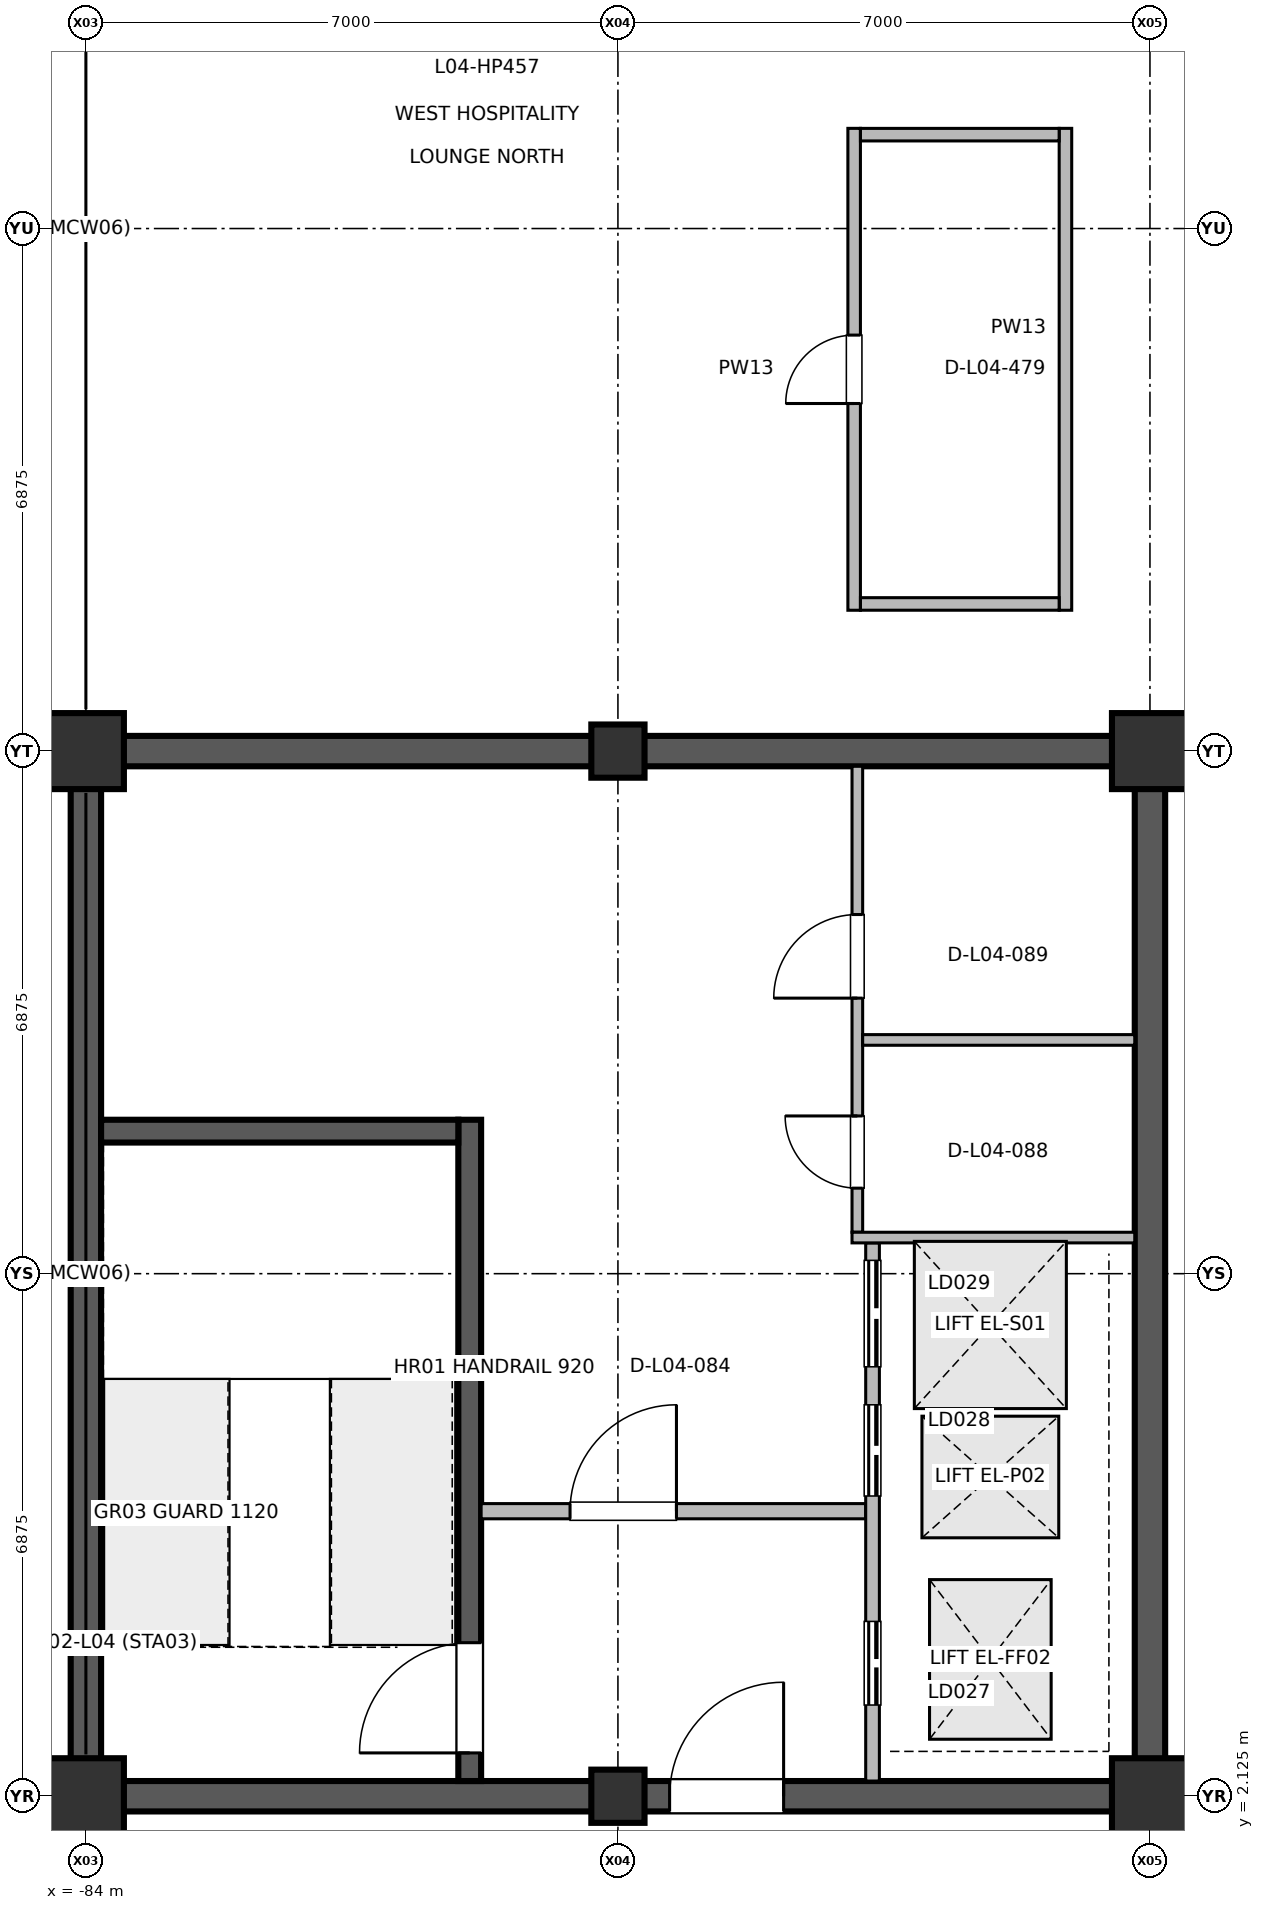
"""IFC4 building model, lengths in metres.
Left out: names, types, materials, properties, quantities, classifications, styles, units other than length and angle.
Written with IfcOpenShell. Run it as: python <this file> out.ifc"""

import sys

from ifc_helpers import new_model, si_unit, direction, frame, frame_2d, origin, origin_2d, place, context, subcontext, project, spatial, rectangle, extrude, element, fill, save


model = new_model("IFC4")
c1 = context("Model", 3, precision=1e-05, world=origin(), true_north=direction((0.0, 1.0)))
c2 = subcontext(c1, "Body", "Model", "MODEL_VIEW")
j1 = project(units=[si_unit("LENGTHUNIT", "METRE"), si_unit("PLANEANGLEUNIT", "RADIAN")], contexts=[c1])
p1 = place(None, origin())
s1 = spatial("IfcSite", under=j1, at=p1, CompositionType="ELEMENT")
p2 = place(p1, origin())
s2 = spatial("IfcBuilding", under=s1, at=p2, CompositionType="ELEMENT")
p3 = place(p2, frame((0.0, 0.0, 16.2)))
s3 = spatial("IfcBuildingStorey", under=s2, at=p3, CompositionType="ELEMENT", Elevation=16.2)
for number, where, z_axis, x_axis in (
    (1, (-84.0, 2.125, 0.0), (0.0, 0.0, 1.0), (1.0, 0.0, 0.0)),
    (2, (-84.0, 15.875, 0.0), (0.0, 0.0, 1.0), (1.0, 0.0, 0.0)),
):
    element("IfcColumn", number, at=place(p3, frame(where, z_axis=z_axis, x_axis=x_axis)), inside=s3, PredefinedType="COLUMN", context=c2, shape_type="SweptSolid", body=[
        extrude(rectangle(XDim=1.0, YDim=1.0, at=origin_2d()), origin(), (0.0, 0.0, 1.0), 4.798),
    ])
for number, where, z_axis, x_axis in (
    (3, (-77.0, 2.125, 0.0), (0.0, 0.0, 1.0), (1.0, 0.0, 0.0)),
    (4, (-77.0, 15.875, 0.0), (0.0, 0.0, 1.0), (1.0, 0.0, 0.0)),
):
    element("IfcColumn", number, at=place(p3, frame(where, z_axis=z_axis, x_axis=x_axis)), inside=s3, PredefinedType="COLUMN", context=c2, shape_type="SweptSolid", body=[
        extrude(rectangle(XDim=0.7, YDim=0.7, at=origin_2d()), origin(), (0.0, 0.0, 1.0), 4.6),
    ])
for number, where, z_axis, x_axis in (
    (5, (-70.0, 2.125, 0.0), (0.0, 0.0, 1.0), (1.0, 0.0, 0.0)),
    (6, (-70.0, 15.875, 0.0), (0.0, 0.0, 1.0), (1.0, 0.0, 0.0)),
):
    element("IfcColumn", number, at=place(p3, frame(where, z_axis=z_axis, x_axis=x_axis)), inside=s3, PredefinedType="COLUMN", context=c2, shape_type="SweptSolid", body=[
        extrude(rectangle(XDim=1.0, YDim=1.0, at=origin_2d()), origin(), (0.0, 0.0, 1.0), 4.798),
    ])
for number, where, z_axis, x_axis in (
    (7, (-84.0, 2.325, 0.0), (0.0, 0.0, 1.0), (0.0, 1.0, 0.0)),
    (8, (-70.0, 2.325, 0.0), (0.0, 0.0, 1.0), (0.0, 1.0, 0.0)),
):
    element("IfcWall", number, at=place(p3, frame(where, z_axis=z_axis, x_axis=x_axis)), inside=s3, PredefinedType="SHEAR", context=c2, shape_type="SweptSolid", body=[
        extrude(rectangle(XDim=13.35, YDim=0.4, at=frame_2d((6.675, 0.0))), origin(), (0.0, 0.0, 1.0), 4.6),
    ])
p4 = place(p3, frame((-83.8, 2.125, 0.0), z_axis=(0.0, 0.0, 1.0), x_axis=(1.0, 0.0, 0.0)))
e9 = element("IfcWall", 9, at=p4, inside=s3, PredefinedType="SHEAR", context=c2, shape_type="SweptSolid", body=[
    extrude(rectangle(XDim=13.6, YDim=0.4, at=frame_2d((6.8, 0.0))), origin(), (0.0, 0.0, 1.0), 4.6),
])
p5 = place(p4, frame((7.48, 0.0, 0.0)))
e10 = element("IfcOpeningElement", 10, at=p5, cuts=e9, PredefinedType="OPENING", context=c2, shape_type="SweptSolid", body=[
    extrude(rectangle(XDim=1.5, YDim=2.2, at=frame_2d((0.75, 1.1))), frame((0.0, 0.21, 0.0), z_axis=(0.0, -1.0, 0.0), x_axis=(1.0, 0.0, 0.0)), (0.0, 0.0, 1.0), 0.42),
])
p6 = place(p3, frame((-83.8, 15.875, 0.0), z_axis=(0.0, 0.0, 1.0), x_axis=(1.0, 0.0, 0.0)))
e11 = element("IfcWall", 11, at=p6, inside=s3, PredefinedType="SHEAR", context=c2, shape_type="SweptSolid", body=[
    extrude(rectangle(XDim=13.6, YDim=0.4, at=frame_2d((6.8, 0.0))), origin(), (0.0, 0.0, 1.0), 4.6),
])
p7 = place(p3, frame((-78.95, 2.325, 0.0), z_axis=(0.0, 0.0, 1.0), x_axis=(0.0, 1.0, 0.0)))
e12 = element("IfcWall", 12, at=p7, inside=s3, PredefinedType="SHEAR", context=c2, shape_type="SweptSolid", body=[
    extrude(rectangle(XDim=8.7, YDim=0.3, at=frame_2d((4.35, 0.0))), origin(), (0.0, 0.0, 1.0), 4.6),
])
p8 = place(p7, frame((0.37, 0.0, 0.0)))
e13 = element("IfcOpeningElement", 13, at=p8, cuts=e12, PredefinedType="OPENING", context=c2, shape_type="SweptSolid", body=[
    extrude(rectangle(XDim=1.45, YDim=2.2, at=frame_2d((0.725, 1.1))), frame((0.0, 0.16, 0.0), z_axis=(0.0, -1.0, 0.0), x_axis=(1.0, 0.0, 0.0)), (0.0, 0.0, 1.0), 0.32),
])
p9 = place(p3, frame((-78.8, 5.875, 0.0), z_axis=(0.0, 0.0, 1.0), x_axis=(1.0, 0.0, 0.0)))
e14 = element("IfcWall", 14, at=p9, inside=s3, PredefinedType="PARTITIONING", context=c2, shape_type="SweptSolid", body=[
    extrude(rectangle(XDim=5.06, YDim=0.2, at=frame_2d((2.53, 0.0))), origin(), (0.0, 0.0, 1.0), 3.82),
])
p10 = place(p9, frame((1.17, 0.0, 0.0)))
e15 = element("IfcOpeningElement", 15, at=p10, cuts=e14, PredefinedType="OPENING", context=c2, shape_type="SweptSolid", body=[
    extrude(rectangle(XDim=1.4, YDim=2.2, at=frame_2d((0.7, 1.1))), frame((0.0, 0.11, 0.0), z_axis=(0.0, -1.0, 0.0), x_axis=(1.0, 0.0, 0.0)), (0.0, 0.0, 1.0), 0.22),
])
p11 = place(p3, frame((-73.65, 2.325, 0.0), z_axis=(0.0, 0.0, 1.0), x_axis=(0.0, 1.0, 0.0)))
e16 = element("IfcWall", 16, at=p11, inside=s3, PredefinedType="PARTITIONING", context=c2, shape_type="SweptSolid", body=[
    extrude(rectangle(XDim=7.08, YDim=0.18, at=frame_2d((3.54, 0.0))), origin(), (0.0, 0.0, 1.0), 3.82),
])
p12 = place(p11, frame((1.0, 0.0, 0.0)))
e17 = element("IfcOpeningElement", 17, at=p12, cuts=e16, PredefinedType="OPENING", context=c2, shape_type="SweptSolid", body=[
    extrude(rectangle(XDim=1.1, YDim=2.2, at=frame_2d((0.55, 1.1))), frame((0.0, 0.1, 0.0), z_axis=(0.0, -1.0, 0.0), x_axis=(1.0, 0.0, 0.0)), (0.0, 0.0, 1.0), 0.2),
])
p13 = place(p11, frame((3.75, 0.0, 0.0)))
e18 = element("IfcOpeningElement", 18, at=p13, cuts=e16, PredefinedType="OPENING", context=c2, shape_type="SweptSolid", body=[
    extrude(rectangle(XDim=1.2, YDim=2.25, at=frame_2d((0.6, 1.125))), frame((0.0, 0.1, 0.0), z_axis=(0.0, -1.0, 0.0), x_axis=(1.0, 0.0, 0.0)), (0.0, 0.0, 1.0), 0.2),
])
p14 = place(p11, frame((5.45, 0.0, 0.0)))
e19 = element("IfcOpeningElement", 19, at=p14, cuts=e16, PredefinedType="OPENING", context=c2, shape_type="SweptSolid", body=[
    extrude(rectangle(XDim=1.4, YDim=2.3, at=frame_2d((0.7, 1.15))), frame((0.0, 0.1, 0.0), z_axis=(0.0, -1.0, 0.0), x_axis=(1.0, 0.0, 0.0)), (0.0, 0.0, 1.0), 0.2),
])
p15 = place(p3, frame((-73.85, 9.545, 0.0), z_axis=(0.0, 0.0, 1.0), x_axis=(0.0, 1.0, 0.0)))
e20 = element("IfcWall", 20, at=p15, inside=s3, PredefinedType="PARTITIONING", context=c2, shape_type="SweptSolid", body=[
    extrude(rectangle(XDim=6.13, YDim=0.14, at=frame_2d((3.065, 0.0))), origin(), (0.0, 0.0, 1.0), 3.82),
])
p16 = place(p15, frame((0.58, 0.0, 0.0)))
e21 = element("IfcOpeningElement", 21, at=p16, cuts=e20, PredefinedType="OPENING", context=c2, shape_type="SweptSolid", body=[
    extrude(rectangle(XDim=0.95, YDim=2.15, at=frame_2d((0.475, 1.075))), frame((0.0, 0.08, 0.0), z_axis=(0.0, -1.0, 0.0), x_axis=(1.0, 0.0, 0.0)), (0.0, 0.0, 1.0), 0.16),
])
p17 = place(p15, frame((3.08, 0.0, 0.0)))
e22 = element("IfcOpeningElement", 22, at=p17, cuts=e20, PredefinedType="OPENING", context=c2, shape_type="SweptSolid", body=[
    extrude(rectangle(XDim=1.1, YDim=2.15, at=frame_2d((0.55, 1.075))), frame((0.0, 0.08, 0.0), z_axis=(0.0, -1.0, 0.0), x_axis=(1.0, 0.0, 0.0)), (0.0, 0.0, 1.0), 0.16),
])
p18 = place(p3, frame((-73.892, 17.728, 0.0), z_axis=(0.0, 0.0, 1.0), x_axis=(0.0, 1.0, 0.0)))
e23 = element("IfcWall", 23, at=p18, inside=s3, PredefinedType="PARTITIONING", context=c2, shape_type="SweptSolid", body=[
    extrude(rectangle(XDim=6.34, YDim=0.165, at=frame_2d((3.17, 0.0))), origin(), (0.0, 0.0, 1.0), 3.82),
])
p19 = place(p18, frame((2.72, 0.0, 0.0)))
e24 = element("IfcOpeningElement", 24, at=p19, cuts=e23, PredefinedType="OPENING", context=c2, shape_type="SweptSolid", body=[
    extrude(rectangle(XDim=0.9, YDim=2.15, at=frame_2d((0.45, 1.075))), frame((0.0, 0.093, 0.0), z_axis=(0.0, -1.0, 0.0), x_axis=(1.0, 0.0, 0.0)), (0.0, 0.0, 1.0), 0.185),
])
p20 = place(p3, frame((-73.92, 9.475, 0.0), z_axis=(0.0, 0.0, 1.0), x_axis=(1.0, 0.0, 0.0)))
e25 = element("IfcWall", 25, at=p20, inside=s3, PredefinedType="PARTITIONING", context=c2, shape_type="SweptSolid", body=[
    extrude(rectangle(XDim=3.72, YDim=0.14, at=frame_2d((1.86, 0.0))), origin(), (0.0, 0.0, 1.0), 3.82),
])
p21 = place(p3, frame((-73.78, 12.075, 0.0), z_axis=(0.0, 0.0, 1.0), x_axis=(1.0, 0.0, 0.0)))
e26 = element("IfcWall", 26, at=p21, inside=s3, PredefinedType="PARTITIONING", context=c2, shape_type="SweptSolid", body=[
    extrude(rectangle(XDim=3.58, YDim=0.14, at=frame_2d((1.79, 0.0))), origin(), (0.0, 0.0, 1.0), 3.82),
])
p22 = place(p3, frame((-71.112, 17.728, 0.0), z_axis=(0.0, 0.0, 1.0), x_axis=(0.0, 1.0, 0.0)))
e27 = element("IfcWall", 27, at=p22, inside=s3, PredefinedType="PARTITIONING", context=c2, shape_type="SweptSolid", body=[
    extrude(rectangle(XDim=6.34, YDim=0.165, at=frame_2d((3.17, 0.0))), origin(), (0.0, 0.0, 1.0), 3.82),
])
for number, where, z_axis, x_axis in (
    (28, (-73.809, 17.811, 0.0), (0.0, 0.0, 1.0), (1.0, 0.0, 0.0)),
    (29, (-73.809, 23.985, 0.0), (0.0, 0.0, 1.0), (1.0, 0.0, 0.0)),
):
    element("IfcWall", number, at=place(p3, frame(where, z_axis=z_axis, x_axis=x_axis)), inside=s3, PredefinedType="PARTITIONING", context=c2, shape_type="SweptSolid", body=[
        extrude(rectangle(XDim=2.614, YDim=0.165, at=frame_2d((1.307, 0.0))), origin(), (0.0, 0.0, 1.0), 3.82),
    ])
p23 = place(p3, frame((-83.8, 10.875, 0.0), z_axis=(0.0, 0.0, 1.0), x_axis=(1.0, 0.0, 0.0)))
e30 = element("IfcWall", 30, at=p23, inside=s3, PredefinedType="SHEAR", context=c2, shape_type="SweptSolid", body=[
    extrude(rectangle(XDim=4.7, YDim=0.3, at=frame_2d((2.35, 0.0))), origin(), (0.0, 0.0, 1.0), 4.6),
])
p24 = place(p5, origin())
e31 = element("IfcDoor", 31, at=p24, inside=s3, OperationType="SINGLE_SWING_RIGHT", PredefinedType="DOOR", context=c2, shape_type="SweptSolid", body=[
    extrude(rectangle(XDim=1.5, YDim=2.2, at=frame_2d((0.75, 1.1))), frame((0.0, 0.025, 0.0), z_axis=(0.0, -1.0, 0.0), x_axis=(1.0, 0.0, 0.0)), (0.0, 0.0, 1.0), 0.05),
])
fill(e10, e31)
p25 = place(p8, origin())
e32 = element("IfcDoor", 32, at=p25, inside=s3, OperationType="SINGLE_SWING_LEFT", PredefinedType="DOOR", context=c2, shape_type="SweptSolid", body=[
    extrude(rectangle(XDim=1.45, YDim=2.2, at=frame_2d((0.725, 1.1))), frame((0.0, 0.025, 0.0), z_axis=(0.0, -1.0, 0.0), x_axis=(1.0, 0.0, 0.0)), (0.0, 0.0, 1.0), 0.05),
])
fill(e13, e32)
p26 = place(p10, origin())
e33 = element("IfcDoor", 33, at=p26, inside=s3, OperationType="SINGLE_SWING_RIGHT", PredefinedType="DOOR", context=c2, shape_type="SweptSolid", body=[
    extrude(rectangle(XDim=1.4, YDim=2.2, at=frame_2d((0.7, 1.1))), frame((0.0, 0.025, 0.0), z_axis=(0.0, -1.0, 0.0), x_axis=(1.0, 0.0, 0.0)), (0.0, 0.0, 1.0), 0.05),
])
fill(e15, e33)
p27 = place(p12, origin())
e34 = element("IfcDoor", 34, at=p27, inside=s3, OperationType="DOUBLE_DOOR_SLIDING", PredefinedType="DOOR", context=c2, shape_type="SweptSolid", body=[
    extrude(rectangle(XDim=1.1, YDim=2.2, at=frame_2d((0.55, 1.1))), frame((0.0, 0.025, 0.0), z_axis=(0.0, -1.0, 0.0), x_axis=(1.0, 0.0, 0.0)), (0.0, 0.0, 1.0), 0.05),
])
fill(e17, e34)
p28 = place(p13, origin())
e35 = element("IfcDoor", 35, at=p28, inside=s3, OperationType="DOUBLE_DOOR_SLIDING", PredefinedType="DOOR", context=c2, shape_type="SweptSolid", body=[
    extrude(rectangle(XDim=1.2, YDim=2.25, at=frame_2d((0.6, 1.125))), frame((0.0, 0.025, 0.0), z_axis=(0.0, -1.0, 0.0), x_axis=(1.0, 0.0, 0.0)), (0.0, 0.0, 1.0), 0.05),
])
fill(e18, e35)
p29 = place(p14, origin())
e36 = element("IfcDoor", 36, at=p29, inside=s3, OperationType="DOUBLE_DOOR_SLIDING", PredefinedType="DOOR", context=c2, shape_type="SweptSolid", body=[
    extrude(rectangle(XDim=1.4, YDim=2.3, at=frame_2d((0.7, 1.15))), frame((0.0, 0.025, 0.0), z_axis=(0.0, -1.0, 0.0), x_axis=(1.0, 0.0, 0.0)), (0.0, 0.0, 1.0), 0.05),
])
fill(e19, e36)
p30 = place(p16, origin())
e37 = element("IfcDoor", 37, at=p30, inside=s3, OperationType="SINGLE_SWING_RIGHT", PredefinedType="DOOR", context=c2, shape_type="SweptSolid", body=[
    extrude(rectangle(XDim=0.95, YDim=2.15, at=frame_2d((0.475, 1.075))), frame((0.0, 0.025, 0.0), z_axis=(0.0, -1.0, 0.0), x_axis=(1.0, 0.0, 0.0)), (0.0, 0.0, 1.0), 0.05),
])
fill(e21, e37)
p31 = place(p17, origin())
e38 = element("IfcDoor", 38, at=p31, inside=s3, OperationType="SINGLE_SWING_LEFT", PredefinedType="DOOR", context=c2, shape_type="SweptSolid", body=[
    extrude(rectangle(XDim=1.1, YDim=2.15, at=frame_2d((0.55, 1.075))), frame((0.0, 0.025, 0.0), z_axis=(0.0, -1.0, 0.0), x_axis=(1.0, 0.0, 0.0)), (0.0, 0.0, 1.0), 0.05),
])
fill(e22, e38)
p32 = place(p19, origin())
e39 = element("IfcDoor", 39, at=p32, inside=s3, OperationType="SINGLE_SWING_LEFT", PredefinedType="DOOR", context=c2, shape_type="SweptSolid", body=[
    extrude(rectangle(XDim=0.9, YDim=2.15, at=frame_2d((0.45, 1.075))), frame((0.0, 0.025, 0.0), z_axis=(0.0, -1.0, 0.0), x_axis=(1.0, 0.0, 0.0)), (0.0, 0.0, 1.0), 0.05),
])
fill(e24, e39)
save(model, sys.argv[1])
